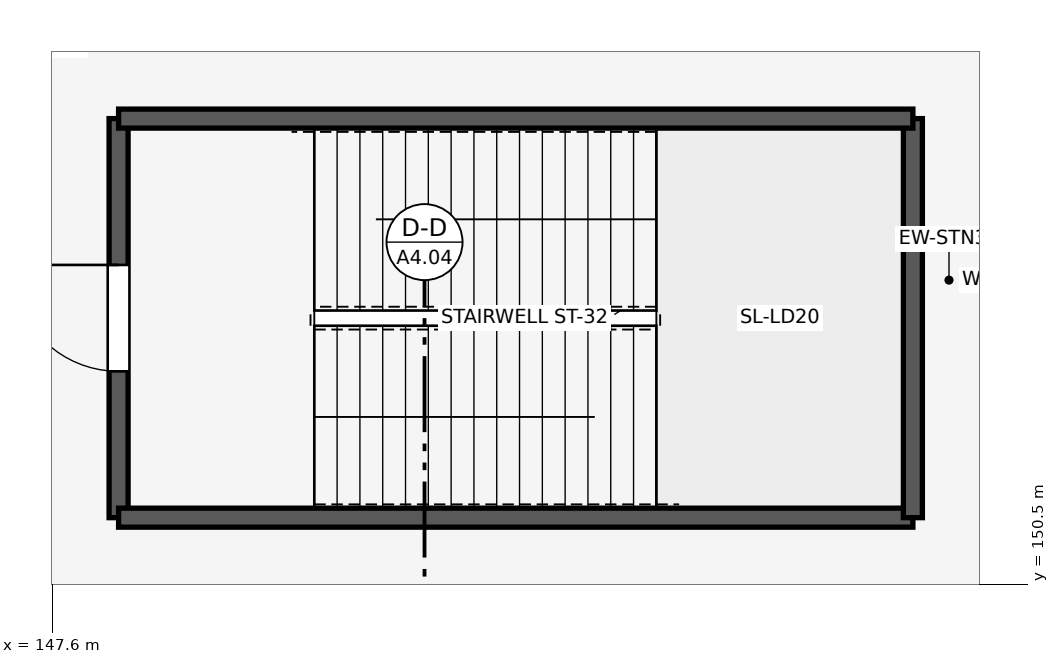
"""IFC4 building model, lengths in metres.
Left out: names, types, materials, properties, quantities, classifications, styles, units other than length and angle.
Written with IfcOpenShell. Run it as: python <this file> out.ifc"""

import sys

from ifc_helpers import new_model, si_unit, direction, frame, frame_2d, origin, place, context, subcontext, project, spatial, rectangle, extrude, element, fill, save


model = new_model("IFC4")
c1 = context("Model", 3, precision=1e-05, world=origin(), true_north=direction((0.0, 1.0)))
c2 = subcontext(c1, "Body", "Model", "MODEL_VIEW")
j1 = project(units=[si_unit("LENGTHUNIT", "METRE"), si_unit("PLANEANGLEUNIT", "RADIAN")], contexts=[c1])
p1 = place(None, origin())
s1 = spatial("IfcSite", under=j1, at=p1, CompositionType="ELEMENT")
p2 = place(p1, origin())
s2 = spatial("IfcBuilding", under=s1, at=p2, CompositionType="ELEMENT")
p3 = place(p2, frame((0.0, 0.0, 5.4)))
s3 = spatial("IfcBuildingStorey", under=s2, at=p3, CompositionType="ELEMENT", Elevation=5.4)
p4 = place(p3, frame((148.475, 156.625, 0.0), z_axis=(0.0, 0.0, 1.0), x_axis=(0.0, -1.0, 0.0)))
e1 = element("IfcWall", 1, at=p4, inside=s3, PredefinedType="SHEAR", context=c2, shape_type="SweptSolid", body=[
    extrude(rectangle(XDim=5.25, YDim=0.25, at=frame_2d((2.625, 0.0))), origin(), (0.0, 0.0, 1.0), 4.92),
])
p5 = place(p4, frame((1.925, 0.0, 0.0)))
e2 = element("IfcOpeningElement", 2, at=p5, cuts=e1, PredefinedType="OPENING", context=c2, shape_type="SweptSolid", body=[
    extrude(rectangle(XDim=1.4, YDim=2.2, at=frame_2d((0.7, 1.1))), frame((0.0, 0.135, 0.0), z_axis=(0.0, -1.0, 0.0), x_axis=(1.0, 0.0, 0.0)), (0.0, 0.0, 1.0), 0.27),
])
p6 = place(p3, frame((148.475, 151.375, 0.0), z_axis=(0.0, 0.0, 1.0), x_axis=(1.0, 0.0, 0.0)))
e3 = element("IfcWall", 3, at=p6, inside=s3, PredefinedType="SHEAR", context=c2, shape_type="SweptSolid", body=[
    extrude(rectangle(XDim=10.45, YDim=0.25, at=frame_2d((5.225, 0.0))), origin(), (0.0, 0.0, 1.0), 4.92),
])
p7 = place(p3, frame((158.925, 151.375, 0.0), z_axis=(0.0, 0.0, 1.0), x_axis=(0.0, 1.0, 0.0)))
e4 = element("IfcWall", 4, at=p7, inside=s3, PredefinedType="SHEAR", context=c2, shape_type="SweptSolid", body=[
    extrude(rectangle(XDim=5.25, YDim=0.25, at=frame_2d((2.625, 0.0))), origin(), (0.0, 0.0, 1.0), 4.92),
])
p8 = place(p3, frame((158.925, 156.625, 0.0), z_axis=(0.0, 0.0, 1.0), x_axis=(-1.0, 0.0, 0.0)))
e5 = element("IfcWall", 5, at=p8, inside=s3, PredefinedType="SHEAR", context=c2, shape_type="SweptSolid", body=[
    extrude(rectangle(XDim=10.45, YDim=0.25, at=frame_2d((5.225, 0.0))), origin(), (0.0, 0.0, 1.0), 4.92),
])
p9 = place(p5, frame((1.4, 0.0, 0.0), z_axis=(0.0, 0.0, 1.0), x_axis=(-1.0, 0.0, 0.0)))
e6 = element("IfcDoor", 6, at=p9, inside=s3, OperationType="SINGLE_SWING_RIGHT", PredefinedType="DOOR", context=c2, shape_type="SweptSolid", body=[
    extrude(rectangle(XDim=1.4, YDim=2.2, at=frame_2d((0.7, 1.1))), frame((0.0, 0.025, 0.0), z_axis=(0.0, -1.0, 0.0), x_axis=(1.0, 0.0, 0.0)), (0.0, 0.0, 1.0), 0.05),
])
fill(e2, e6)
save(model, sys.argv[1])
